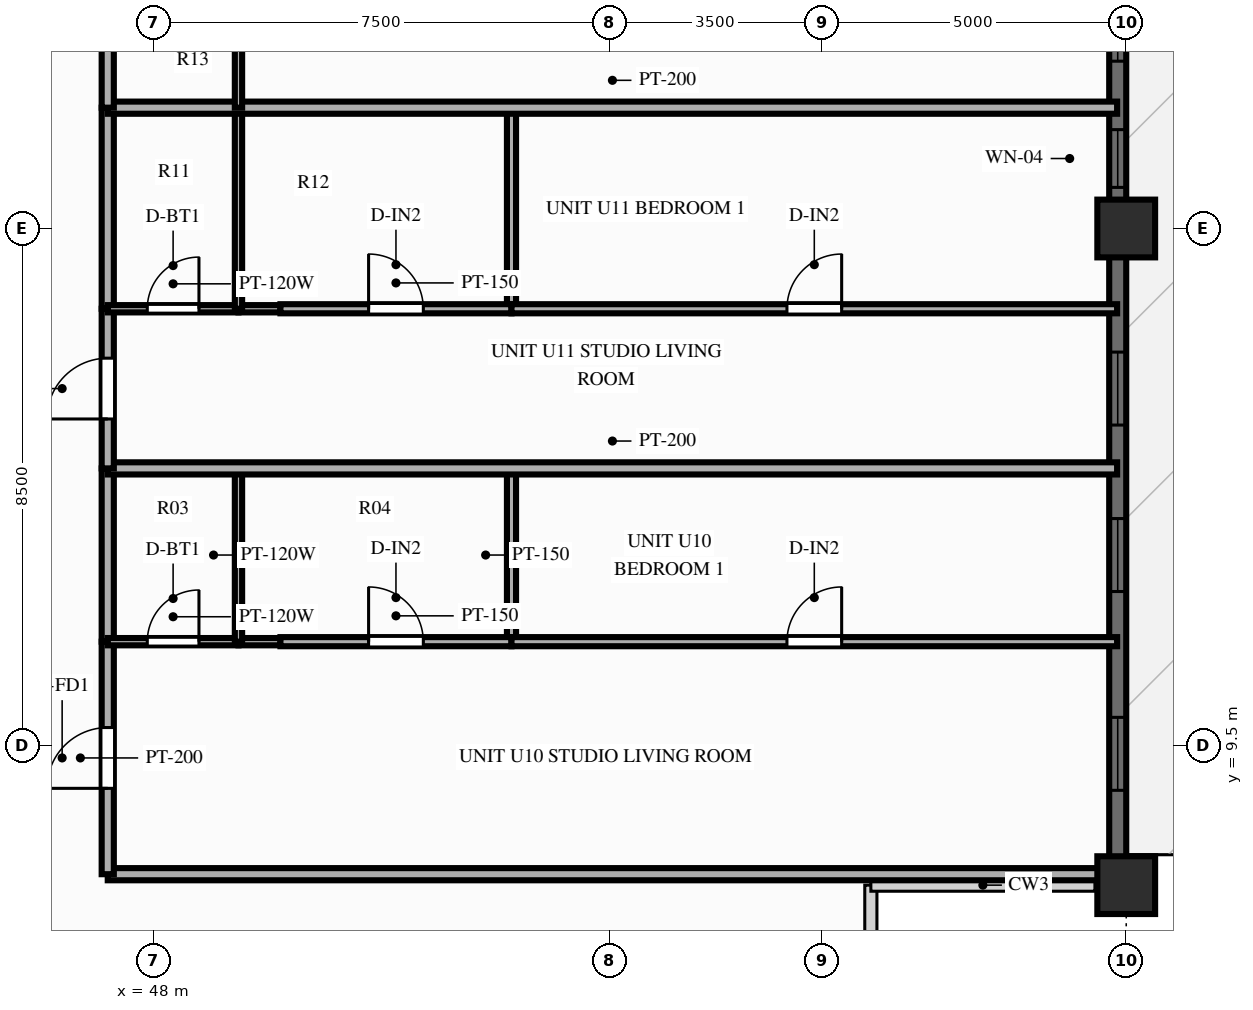
"""IFC4 building model, lengths in metres.
Left out: names, types, materials, properties, quantities, classifications, styles, units other than length and angle.
Written with IfcOpenShell. Run it as: python <this file> out.ifc"""

import sys

from ifc_helpers import new_model, si_unit, direction, frame, frame_2d, origin, origin_2d, place, context, subcontext, project, spatial, rectangle, extrude, source, transform, mapped, element, fill, save


model = new_model("IFC4")
c1 = context("Model", 3, precision=1e-05, world=origin(), true_north=direction((0.0, 1.0)))
c2 = subcontext(c1, "Body", "Model", "MODEL_VIEW")
j1 = project(units=[si_unit("LENGTHUNIT", "METRE"), si_unit("PLANEANGLEUNIT", "RADIAN")], contexts=[c1])
p1 = place(None, origin())
s1 = spatial("IfcSite", under=j1, at=p1, CompositionType="ELEMENT")
p2 = place(p1, origin())
s2 = spatial("IfcBuilding", under=s1, at=p2, CompositionType="ELEMENT")
p3 = place(p2, frame((0.0, 0.0, 116.85)))
s3 = spatial("IfcBuildingStorey", under=s2, at=p3, CompositionType="ELEMENT", Elevation=116.85)
m1 = source(origin(), c2, "Body", "SweptSolid", [
    extrude(rectangle(XDim=0.95, YDim=0.95, at=origin_2d()), origin(), (0.0, 0.0, 1.0), 3.0),
])
for number, where, z_axis, x_axis in (
    (1, (64.0, 7.2, 0.0), (0.0, 0.0, 1.0), (1.0, 0.0, 0.0)),
    (2, (64.0, 18.0, 0.0), (0.0, 0.0, 1.0), (1.0, 0.0, 0.0)),
):
    element("IfcColumn", number, at=place(p3, frame(where, z_axis=z_axis, x_axis=x_axis)), inside=s3, PredefinedType="COLUMN", context=c2, shape_type="MappedRepresentation", body=[
        mapped(m1, transform((0.0, 0.0, 0.0), scale=1.0)),
    ])
p4 = place(p3, frame((63.86, 7.2, 0.0), z_axis=(0.0, 0.0, 1.0), x_axis=(0.0, 1.0, 0.0)))
e3 = element("IfcWall", 3, at=p4, inside=s3, PredefinedType="SOLIDWALL", context=c2, shape_type="SweptSolid", body=[
    extrude(rectangle(XDim=39.6, YDim=0.28, at=frame_2d((19.8, 0.0))), origin(), (0.0, 0.0, 1.0), 2.28),
])
p5 = place(p4, frame((1.56, 0.0, 0.25)))
e4 = element("IfcOpeningElement", 4, at=p5, cuts=e3, PredefinedType="OPENING", context=c2, shape_type="SweptSolid", body=[
    extrude(rectangle(XDim=1.2, YDim=1.5, at=frame_2d((0.6, 0.75))), frame((0.0, 0.152, 0.0), z_axis=(0.0, -1.0, 0.0), x_axis=(1.0, 0.0, 0.0)), (0.0, 0.0, 1.0), 0.304),
])
p6 = place(p4, frame((4.829, 0.0, 0.25)))
e5 = element("IfcOpeningElement", 5, at=p6, cuts=e3, PredefinedType="OPENING", context=c2, shape_type="SweptSolid", body=[
    extrude(rectangle(XDim=1.2, YDim=1.5, at=frame_2d((0.6, 0.75))), frame((0.0, 0.152, 0.0), z_axis=(0.0, -1.0, 0.0), x_axis=(1.0, 0.0, 0.0)), (0.0, 0.0, 1.0), 0.304),
])
p7 = place(p4, frame((7.567, 0.0, 0.25)))
e6 = element("IfcOpeningElement", 6, at=p7, cuts=e3, PredefinedType="OPENING", context=c2, shape_type="SweptSolid", body=[
    extrude(rectangle(XDim=1.2, YDim=1.5, at=frame_2d((0.6, 0.75))), frame((0.0, 0.152, 0.0), z_axis=(0.0, -1.0, 0.0), x_axis=(1.0, 0.0, 0.0)), (0.0, 0.0, 1.0), 0.304),
])
p8 = place(p4, frame((11.476, 0.0, 0.25)))
e7 = element("IfcOpeningElement", 7, at=p8, cuts=e3, PredefinedType="OPENING", context=c2, shape_type="SweptSolid", body=[
    extrude(rectangle(XDim=0.95, YDim=1.5, at=frame_2d((0.475, 0.75))), frame((0.0, 0.152, 0.0), z_axis=(0.0, -1.0, 0.0), x_axis=(1.0, 0.0, 0.0)), (0.0, 0.0, 1.0), 0.304),
])
p9 = place(p4, frame((13.552, 0.0, 0.25)))
e8 = element("IfcOpeningElement", 8, at=p9, cuts=e3, PredefinedType="OPENING", context=c2, shape_type="SweptSolid", body=[
    extrude(rectangle(XDim=1.2, YDim=1.5, at=frame_2d((0.6, 0.75))), frame((0.0, 0.152, 0.0), z_axis=(0.0, -1.0, 0.0), x_axis=(1.0, 0.0, 0.0)), (0.0, 0.0, 1.0), 0.304),
])
p10 = place(p4, frame((16.518, 0.0, 0.25)))
e9 = element("IfcOpeningElement", 9, at=p10, cuts=e3, PredefinedType="OPENING", context=c2, shape_type="SweptSolid", body=[
    extrude(rectangle(XDim=1.2, YDim=1.5, at=frame_2d((0.6, 0.75))), frame((0.0, 0.152, 0.0), z_axis=(0.0, -1.0, 0.0), x_axis=(1.0, 0.0, 0.0)), (0.0, 0.0, 1.0), 0.304),
])
p11 = place(p4, frame((19.2, 0.0, 0.25)))
e10 = element("IfcOpeningElement", 10, at=p11, cuts=e3, PredefinedType="OPENING", context=c2, shape_type="SweptSolid", body=[
    extrude(rectangle(XDim=1.2, YDim=1.5, at=frame_2d((0.6, 0.75))), frame((0.0, 0.152, 0.0), z_axis=(0.0, -1.0, 0.0), x_axis=(1.0, 0.0, 0.0)), (0.0, 0.0, 1.0), 0.304),
])
p12 = place(p4, frame((21.578, 0.0, 0.25)))
e11 = element("IfcOpeningElement", 11, at=p12, cuts=e3, PredefinedType="OPENING", context=c2, shape_type="SweptSolid", body=[
    extrude(rectangle(XDim=1.2, YDim=1.5, at=frame_2d((0.6, 0.75))), frame((0.0, 0.152, 0.0), z_axis=(0.0, -1.0, 0.0), x_axis=(1.0, 0.0, 0.0)), (0.0, 0.0, 1.0), 0.304),
])
p13 = place(p4, frame((26.313, 0.0, 0.0), z_axis=(0.0, 0.0, 1.0), x_axis=(-1.0, 0.0, 0.0)))
e12 = element("IfcOpeningElement", 12, at=p13, cuts=e3, PredefinedType="OPENING", context=c2, shape_type="SweptSolid", body=[
    extrude(rectangle(XDim=1.6, YDim=2.15, at=frame_2d((0.8, 1.075))), frame((0.0, 0.152, 0.0), z_axis=(0.0, -1.0, 0.0), x_axis=(1.0, 0.0, 0.0)), (0.0, 0.0, 1.0), 0.304),
])
p14 = place(p4, frame((29.305, 0.0, 0.25)))
e13 = element("IfcOpeningElement", 13, at=p14, cuts=e3, PredefinedType="OPENING", context=c2, shape_type="SweptSolid", body=[
    extrude(rectangle(XDim=0.7, YDim=1.5, at=frame_2d((0.35, 0.75))), frame((0.0, 0.152, 0.0), z_axis=(0.0, -1.0, 0.0), x_axis=(1.0, 0.0, 0.0)), (0.0, 0.0, 1.0), 0.304),
])
p15 = place(p4, frame((30.848, 0.0, 0.25)))
e14 = element("IfcOpeningElement", 14, at=p15, cuts=e3, PredefinedType="OPENING", context=c2, shape_type="SweptSolid", body=[
    extrude(rectangle(XDim=1.2, YDim=1.5, at=frame_2d((0.6, 0.75))), frame((0.0, 0.152, 0.0), z_axis=(0.0, -1.0, 0.0), x_axis=(1.0, 0.0, 0.0)), (0.0, 0.0, 1.0), 0.304),
])
p16 = place(p4, frame((34.183, 0.0, 0.25)))
e15 = element("IfcOpeningElement", 15, at=p16, cuts=e3, PredefinedType="OPENING", context=c2, shape_type="SweptSolid", body=[
    extrude(rectangle(XDim=1.2, YDim=1.5, at=frame_2d((0.6, 0.75))), frame((0.0, 0.152, 0.0), z_axis=(0.0, -1.0, 0.0), x_axis=(1.0, 0.0, 0.0)), (0.0, 0.0, 1.0), 0.304),
])
p17 = place(p4, frame((37.452, 0.0, 0.25)))
e16 = element("IfcOpeningElement", 16, at=p17, cuts=e3, PredefinedType="OPENING", context=c2, shape_type="SweptSolid", body=[
    extrude(rectangle(XDim=1.2, YDim=1.5, at=frame_2d((0.6, 0.75))), frame((0.0, 0.152, 0.0), z_axis=(0.0, -1.0, 0.0), x_axis=(1.0, 0.0, 0.0)), (0.0, 0.0, 1.0), 0.304),
])
p18 = place(p3, frame((47.25, 7.38, 0.0), z_axis=(0.0, 0.0, 1.0), x_axis=(1.0, 0.0, 0.0)))
e17 = element("IfcWall", 17, at=p18, inside=s3, PredefinedType="PARTITIONING", context=c2, shape_type="SweptSolid", body=[
    extrude(rectangle(XDim=16.6, YDim=0.2, at=frame_2d((8.3, 0.0))), origin(), (0.0, 0.0, 1.0), 2.79),
])
p19 = place(p3, frame((47.25, 7.38, 0.0), z_axis=(0.0, 0.0, 1.0), x_axis=(0.0, 1.0, 0.0)))
e18 = element("IfcWall", 18, at=p19, inside=s3, PredefinedType="PARTITIONING", context=c2, shape_type="SweptSolid", body=[
    extrude(rectangle(XDim=3.824, YDim=0.2, at=frame_2d((1.912, 0.0))), origin(), (0.0, 0.0, 1.0), 2.79),
])
p20 = place(p19, frame((1.412, 0.0, 0.0)))
e19 = element("IfcOpeningElement", 19, at=p20, cuts=e18, PredefinedType="OPENING", context=c2, shape_type="SweptSolid", body=[
    extrude(rectangle(XDim=1.0, YDim=2.15, at=frame_2d((0.5, 1.075))), frame((0.0, 0.112, 0.0), z_axis=(0.0, -1.0, 0.0), x_axis=(1.0, 0.0, 0.0)), (0.0, 0.0, 1.0), 0.224),
])
p21 = place(p3, frame((47.25, 11.204, 0.0), z_axis=(0.0, 0.0, 1.0), x_axis=(0.0, 1.0, 0.0)))
e20 = element("IfcWall", 20, at=p21, inside=s3, PredefinedType="PARTITIONING", context=c2, shape_type="SweptSolid", body=[
    extrude(rectangle(XDim=2.85, YDim=0.2, at=frame_2d((1.425, 0.0))), origin(), (0.0, 0.0, 1.0), 2.79),
])
p22 = place(p3, frame((47.25, 11.204, 0.0), z_axis=(0.0, 0.0, 1.0), x_axis=(1.0, 0.0, 0.0)))
e21 = element("IfcWall", 21, at=p22, inside=s3, PredefinedType="PARTITIONING", context=c2, shape_type="SweptSolid", body=[
    extrude(rectangle(XDim=2.15, YDim=0.12, at=frame_2d((1.075, 0.0))), origin(), (0.0, 0.0, 1.0), 2.79),
])
p23 = place(p22, frame((0.65, 0.0, 0.0)))
e22 = element("IfcOpeningElement", 22, at=p23, cuts=e21, PredefinedType="OPENING", context=c2, shape_type="SweptSolid", body=[
    extrude(rectangle(XDim=0.85, YDim=2.05, at=frame_2d((0.425, 1.025))), frame((0.0, 0.072, 0.0), z_axis=(0.0, -1.0, 0.0), x_axis=(1.0, 0.0, 0.0)), (0.0, 0.0, 1.0), 0.144),
])
p24 = place(p3, frame((49.4, 11.204, 0.0), z_axis=(0.0, 0.0, 1.0), x_axis=(1.0, 0.0, 0.0)))
e23 = element("IfcWall", 23, at=p24, inside=s3, PredefinedType="PARTITIONING", context=c2, shape_type="SweptSolid", body=[
    extrude(rectangle(XDim=0.69, YDim=0.12, at=frame_2d((0.345, 0.0))), origin(), (0.0, 0.0, 1.0), 2.79),
])
p25 = place(p3, frame((49.4, 11.204, 0.0), z_axis=(0.0, 0.0, 1.0), x_axis=(0.0, 1.0, 0.0)))
e24 = element("IfcWall", 24, at=p25, inside=s3, PredefinedType="PARTITIONING", context=c2, shape_type="SweptSolid", body=[
    extrude(rectangle(XDim=2.85, YDim=0.12, at=frame_2d((1.425, 0.0))), origin(), (0.0, 0.0, 1.0), 2.79),
])
p26 = place(p3, frame((53.89, 11.204, 0.0), z_axis=(0.0, 0.0, 1.0), x_axis=(0.0, 1.0, 0.0)))
e25 = element("IfcWall", 25, at=p26, inside=s3, PredefinedType="PARTITIONING", context=c2, shape_type="SweptSolid", body=[
    extrude(rectangle(XDim=2.85, YDim=0.15, at=frame_2d((1.425, 0.0))), origin(), (0.0, 0.0, 1.0), 2.79),
])
p27 = place(p3, frame((50.09, 11.204, 0.0), z_axis=(0.0, 0.0, 1.0), x_axis=(1.0, 0.0, 0.0)))
e26 = element("IfcWall", 26, at=p27, inside=s3, PredefinedType="PARTITIONING", context=c2, shape_type="SweptSolid", body=[
    extrude(rectangle(XDim=3.8, YDim=0.15, at=frame_2d((1.9, 0.0))), origin(), (0.0, 0.0, 1.0), 2.79),
])
p28 = place(p27, frame((1.45, 0.0, 0.0)))
e27 = element("IfcOpeningElement", 27, at=p28, cuts=e26, PredefinedType="OPENING", context=c2, shape_type="SweptSolid", body=[
    extrude(rectangle(XDim=0.9, YDim=2.1, at=frame_2d((0.45, 1.05))), frame((0.0, 0.087, 0.0), z_axis=(0.0, -1.0, 0.0), x_axis=(1.0, 0.0, 0.0)), (0.0, 0.0, 1.0), 0.174),
])
p29 = place(p3, frame((53.89, 11.204, 0.0), z_axis=(0.0, 0.0, 1.0), x_axis=(1.0, 0.0, 0.0)))
e28 = element("IfcWall", 28, at=p29, inside=s3, PredefinedType="PARTITIONING", context=c2, shape_type="SweptSolid", body=[
    extrude(rectangle(XDim=9.96, YDim=0.15, at=frame_2d((4.98, 0.0))), origin(), (0.0, 0.0, 1.0), 2.79),
])
p30 = place(p29, frame((4.53, 0.0, 0.0)))
e29 = element("IfcOpeningElement", 29, at=p30, cuts=e28, PredefinedType="OPENING", context=c2, shape_type="SweptSolid", body=[
    extrude(rectangle(XDim=0.9, YDim=2.1, at=frame_2d((0.45, 1.05))), frame((0.0, 0.087, 0.0), z_axis=(0.0, -1.0, 0.0), x_axis=(1.0, 0.0, 0.0)), (0.0, 0.0, 1.0), 0.174),
])
p31 = place(p3, frame((47.25, 14.054, 0.0), z_axis=(0.0, 0.0, 1.0), x_axis=(1.0, 0.0, 0.0)))
e30 = element("IfcWall", 30, at=p31, inside=s3, PredefinedType="PARTITIONING", context=c2, shape_type="SweptSolid", body=[
    extrude(rectangle(XDim=16.6, YDim=0.2, at=frame_2d((8.3, 0.0))), origin(), (0.0, 0.0, 1.0), 2.79),
])
p32 = place(p3, frame((47.25, 14.054, 0.0), z_axis=(0.0, 0.0, 1.0), x_axis=(0.0, 1.0, 0.0)))
e31 = element("IfcWall", 31, at=p32, inside=s3, PredefinedType="PARTITIONING", context=c2, shape_type="SweptSolid", body=[
    extrude(rectangle(XDim=2.625, YDim=0.2, at=frame_2d((1.313, 0.0))), origin(), (0.0, 0.0, 1.0), 2.79),
])
p33 = place(p32, frame((0.813, 0.0, 0.0)))
e32 = element("IfcOpeningElement", 32, at=p33, cuts=e31, PredefinedType="OPENING", context=c2, shape_type="SweptSolid", body=[
    extrude(rectangle(XDim=1.0, YDim=2.15, at=frame_2d((0.5, 1.075))), frame((0.0, 0.112, 0.0), z_axis=(0.0, -1.0, 0.0), x_axis=(1.0, 0.0, 0.0)), (0.0, 0.0, 1.0), 0.224),
])
p34 = place(p3, frame((47.25, 16.68, 0.0), z_axis=(0.0, 0.0, 1.0), x_axis=(0.0, 1.0, 0.0)))
e33 = element("IfcWall", 33, at=p34, inside=s3, PredefinedType="PARTITIONING", context=c2, shape_type="SweptSolid", body=[
    extrude(rectangle(XDim=3.307, YDim=0.2, at=frame_2d((1.654, 0.0))), origin(), (0.0, 0.0, 1.0), 2.79),
])
p35 = place(p3, frame((47.25, 16.68, 0.0), z_axis=(0.0, 0.0, 1.0), x_axis=(1.0, 0.0, 0.0)))
e34 = element("IfcWall", 34, at=p35, inside=s3, PredefinedType="PARTITIONING", context=c2, shape_type="SweptSolid", body=[
    extrude(rectangle(XDim=2.15, YDim=0.12, at=frame_2d((1.075, 0.0))), origin(), (0.0, 0.0, 1.0), 2.79),
])
p36 = place(p35, frame((0.65, 0.0, 0.0)))
e35 = element("IfcOpeningElement", 35, at=p36, cuts=e34, PredefinedType="OPENING", context=c2, shape_type="SweptSolid", body=[
    extrude(rectangle(XDim=0.85, YDim=2.05, at=frame_2d((0.425, 1.025))), frame((0.0, 0.072, 0.0), z_axis=(0.0, -1.0, 0.0), x_axis=(1.0, 0.0, 0.0)), (0.0, 0.0, 1.0), 0.144),
])
p37 = place(p3, frame((49.4, 16.68, 0.0), z_axis=(0.0, 0.0, 1.0), x_axis=(1.0, 0.0, 0.0)))
e36 = element("IfcWall", 36, at=p37, inside=s3, PredefinedType="PARTITIONING", context=c2, shape_type="SweptSolid", body=[
    extrude(rectangle(XDim=0.69, YDim=0.12, at=frame_2d((0.345, 0.0))), origin(), (0.0, 0.0, 1.0), 2.79),
])
p38 = place(p3, frame((49.4, 16.68, 0.0), z_axis=(0.0, 0.0, 1.0), x_axis=(0.0, 1.0, 0.0)))
e37 = element("IfcWall", 37, at=p38, inside=s3, PredefinedType="PARTITIONING", context=c2, shape_type="SweptSolid", body=[
    extrude(rectangle(XDim=3.307, YDim=0.12, at=frame_2d((1.654, 0.0))), origin(), (0.0, 0.0, 1.0), 2.79),
])
p39 = place(p3, frame((53.89, 16.68, 0.0), z_axis=(0.0, 0.0, 1.0), x_axis=(0.0, 1.0, 0.0)))
e38 = element("IfcWall", 38, at=p39, inside=s3, PredefinedType="PARTITIONING", context=c2, shape_type="SweptSolid", body=[
    extrude(rectangle(XDim=3.307, YDim=0.15, at=frame_2d((1.654, 0.0))), origin(), (0.0, 0.0, 1.0), 2.79),
])
p40 = place(p3, frame((50.09, 16.68, 0.0), z_axis=(0.0, 0.0, 1.0), x_axis=(1.0, 0.0, 0.0)))
e39 = element("IfcWall", 39, at=p40, inside=s3, PredefinedType="PARTITIONING", context=c2, shape_type="SweptSolid", body=[
    extrude(rectangle(XDim=3.8, YDim=0.15, at=frame_2d((1.9, 0.0))), origin(), (0.0, 0.0, 1.0), 2.79),
])
p41 = place(p40, frame((1.45, 0.0, 0.0)))
e40 = element("IfcOpeningElement", 40, at=p41, cuts=e39, PredefinedType="OPENING", context=c2, shape_type="SweptSolid", body=[
    extrude(rectangle(XDim=0.9, YDim=2.1, at=frame_2d((0.45, 1.05))), frame((0.0, 0.087, 0.0), z_axis=(0.0, -1.0, 0.0), x_axis=(1.0, 0.0, 0.0)), (0.0, 0.0, 1.0), 0.174),
])
p42 = place(p3, frame((53.89, 16.68, 0.0), z_axis=(0.0, 0.0, 1.0), x_axis=(1.0, 0.0, 0.0)))
e41 = element("IfcWall", 41, at=p42, inside=s3, PredefinedType="PARTITIONING", context=c2, shape_type="SweptSolid", body=[
    extrude(rectangle(XDim=9.96, YDim=0.15, at=frame_2d((4.98, 0.0))), origin(), (0.0, 0.0, 1.0), 2.79),
])
p43 = place(p42, frame((4.53, 0.0, 0.0)))
e42 = element("IfcOpeningElement", 42, at=p43, cuts=e41, PredefinedType="OPENING", context=c2, shape_type="SweptSolid", body=[
    extrude(rectangle(XDim=0.9, YDim=2.1, at=frame_2d((0.45, 1.05))), frame((0.0, 0.087, 0.0), z_axis=(0.0, -1.0, 0.0), x_axis=(1.0, 0.0, 0.0)), (0.0, 0.0, 1.0), 0.174),
])
p44 = place(p3, frame((47.25, 19.987, 0.0), z_axis=(0.0, 0.0, 1.0), x_axis=(1.0, 0.0, 0.0)))
e43 = element("IfcWall", 43, at=p44, inside=s3, PredefinedType="PARTITIONING", context=c2, shape_type="SweptSolid", body=[
    extrude(rectangle(XDim=16.6, YDim=0.2, at=frame_2d((8.3, 0.0))), origin(), (0.0, 0.0, 1.0), 2.79),
])
p45 = place(p3, frame((47.25, 19.987, 0.0), z_axis=(0.0, 0.0, 1.0), x_axis=(0.0, 1.0, 0.0)))
e44 = element("IfcWall", 44, at=p45, inside=s3, PredefinedType="PARTITIONING", context=c2, shape_type="SweptSolid", body=[
    extrude(rectangle(XDim=2.729, YDim=0.2, at=frame_2d((1.365, 0.0))), origin(), (0.0, 0.0, 1.0), 2.79),
])
p46 = place(p3, frame((49.4, 19.987, 0.0), z_axis=(0.0, 0.0, 1.0), x_axis=(0.0, 1.0, 0.0)))
e45 = element("IfcWall", 45, at=p46, inside=s3, PredefinedType="PARTITIONING", context=c2, shape_type="SweptSolid", body=[
    extrude(rectangle(XDim=2.729, YDim=0.12, at=frame_2d((1.365, 0.0))), origin(), (0.0, 0.0, 1.0), 2.79),
])
m2 = source(origin(), c2, "Body", "SweptSolid", [
    extrude(rectangle(XDim=1.2, YDim=1.5, at=frame_2d((0.6, 0.75))), frame((0.0, 0.03, 0.0), z_axis=(0.0, -1.0, 0.0), x_axis=(1.0, 0.0, 0.0)), (0.0, 0.0, 1.0), 0.06),
])
p47 = place(p5, origin())
e46 = element("IfcWindow", 46, at=p47, inside=s3, PartitioningType="SINGLE_PANEL", PredefinedType="WINDOW", context=c2, shape_type="MappedRepresentation", body=[
    mapped(m2, transform((0.0, 0.0, 0.0), scale=1.0)),
])
fill(e4, e46)
p48 = place(p6, origin())
e47 = element("IfcWindow", 47, at=p48, inside=s3, PartitioningType="SINGLE_PANEL", PredefinedType="WINDOW", context=c2, shape_type="MappedRepresentation", body=[
    mapped(m2, transform((0.0, 0.0, 0.0), scale=1.0)),
])
fill(e5, e47)
p49 = place(p7, origin())
e48 = element("IfcWindow", 48, at=p49, inside=s3, PartitioningType="SINGLE_PANEL", PredefinedType="WINDOW", context=c2, shape_type="MappedRepresentation", body=[
    mapped(m2, transform((0.0, 0.0, 0.0), scale=1.0)),
])
fill(e6, e48)
m3 = source(origin(), c2, "Body", "SweptSolid", [
    extrude(rectangle(XDim=0.95, YDim=1.5, at=frame_2d((0.475, 0.75))), frame((0.0, 0.03, 0.0), z_axis=(0.0, -1.0, 0.0), x_axis=(1.0, 0.0, 0.0)), (0.0, 0.0, 1.0), 0.06),
])
p50 = place(p8, origin())
e49 = element("IfcWindow", 49, at=p50, inside=s3, PartitioningType="SINGLE_PANEL", PredefinedType="WINDOW", context=c2, shape_type="MappedRepresentation", body=[
    mapped(m3, transform((0.0, 0.0, 0.0), scale=1.0)),
])
fill(e7, e49)
p51 = place(p9, origin())
e50 = element("IfcWindow", 50, at=p51, inside=s3, PartitioningType="SINGLE_PANEL", PredefinedType="WINDOW", context=c2, shape_type="MappedRepresentation", body=[
    mapped(m2, transform((0.0, 0.0, 0.0), scale=1.0)),
])
fill(e8, e50)
m4 = source(origin(), c2, "Body", "SweptSolid", [
    extrude(rectangle(XDim=1.0, YDim=2.15, at=frame_2d((0.5, 1.075))), frame((0.0, 0.025, 0.0), z_axis=(0.0, -1.0, 0.0), x_axis=(1.0, 0.0, 0.0)), (0.0, 0.0, 1.0), 0.05),
])
p52 = place(p20, origin())
e51 = element("IfcDoor", 51, at=p52, inside=s3, OperationType="SINGLE_SWING_LEFT", PredefinedType="DOOR", context=c2, shape_type="MappedRepresentation", body=[
    mapped(m4, transform((0.0, 0.0, 0.0), scale=1.0)),
])
fill(e19, e51)
m5 = source(origin(), c2, "Body", "SweptSolid", [
    extrude(rectangle(XDim=0.85, YDim=2.05, at=frame_2d((0.425, 1.025))), frame((0.0, 0.025, 0.0), z_axis=(0.0, -1.0, 0.0), x_axis=(1.0, 0.0, 0.0)), (0.0, 0.0, 1.0), 0.05),
])
p53 = place(p23, origin())
e52 = element("IfcDoor", 52, at=p53, inside=s3, OperationType="SINGLE_SWING_RIGHT", PredefinedType="DOOR", context=c2, shape_type="MappedRepresentation", body=[
    mapped(m5, transform((0.0, 0.0, 0.0), scale=1.0)),
])
fill(e22, e52)
m6 = source(origin(), c2, "Body", "SweptSolid", [
    extrude(rectangle(XDim=0.9, YDim=2.1, at=frame_2d((0.45, 1.05))), frame((0.0, 0.025, 0.0), z_axis=(0.0, -1.0, 0.0), x_axis=(1.0, 0.0, 0.0)), (0.0, 0.0, 1.0), 0.05),
])
p54 = place(p28, origin())
e53 = element("IfcDoor", 53, at=p54, inside=s3, OperationType="SINGLE_SWING_LEFT", PredefinedType="DOOR", context=c2, shape_type="MappedRepresentation", body=[
    mapped(m6, transform((0.0, 0.0, 0.0), scale=1.0)),
])
fill(e27, e53)
p55 = place(p30, origin())
e54 = element("IfcDoor", 54, at=p55, inside=s3, OperationType="SINGLE_SWING_RIGHT", PredefinedType="DOOR", context=c2, shape_type="MappedRepresentation", body=[
    mapped(m6, transform((0.0, 0.0, 0.0), scale=1.0)),
])
fill(e29, e54)
p56 = place(p33, origin())
e55 = element("IfcDoor", 55, at=p56, inside=s3, OperationType="SINGLE_SWING_LEFT", PredefinedType="DOOR", context=c2, shape_type="MappedRepresentation", body=[
    mapped(m4, transform((0.0, 0.0, 0.0), scale=1.0)),
])
fill(e32, e55)
p57 = place(p36, origin())
e56 = element("IfcDoor", 56, at=p57, inside=s3, OperationType="SINGLE_SWING_RIGHT", PredefinedType="DOOR", context=c2, shape_type="MappedRepresentation", body=[
    mapped(m5, transform((0.0, 0.0, 0.0), scale=1.0)),
])
fill(e35, e56)
p58 = place(p41, origin())
e57 = element("IfcDoor", 57, at=p58, inside=s3, OperationType="SINGLE_SWING_LEFT", PredefinedType="DOOR", context=c2, shape_type="MappedRepresentation", body=[
    mapped(m6, transform((0.0, 0.0, 0.0), scale=1.0)),
])
fill(e40, e57)
p59 = place(p43, origin())
e58 = element("IfcDoor", 58, at=p59, inside=s3, OperationType="SINGLE_SWING_RIGHT", PredefinedType="DOOR", context=c2, shape_type="MappedRepresentation", body=[
    mapped(m6, transform((0.0, 0.0, 0.0), scale=1.0)),
])
fill(e42, e58)
save(model, sys.argv[1])
